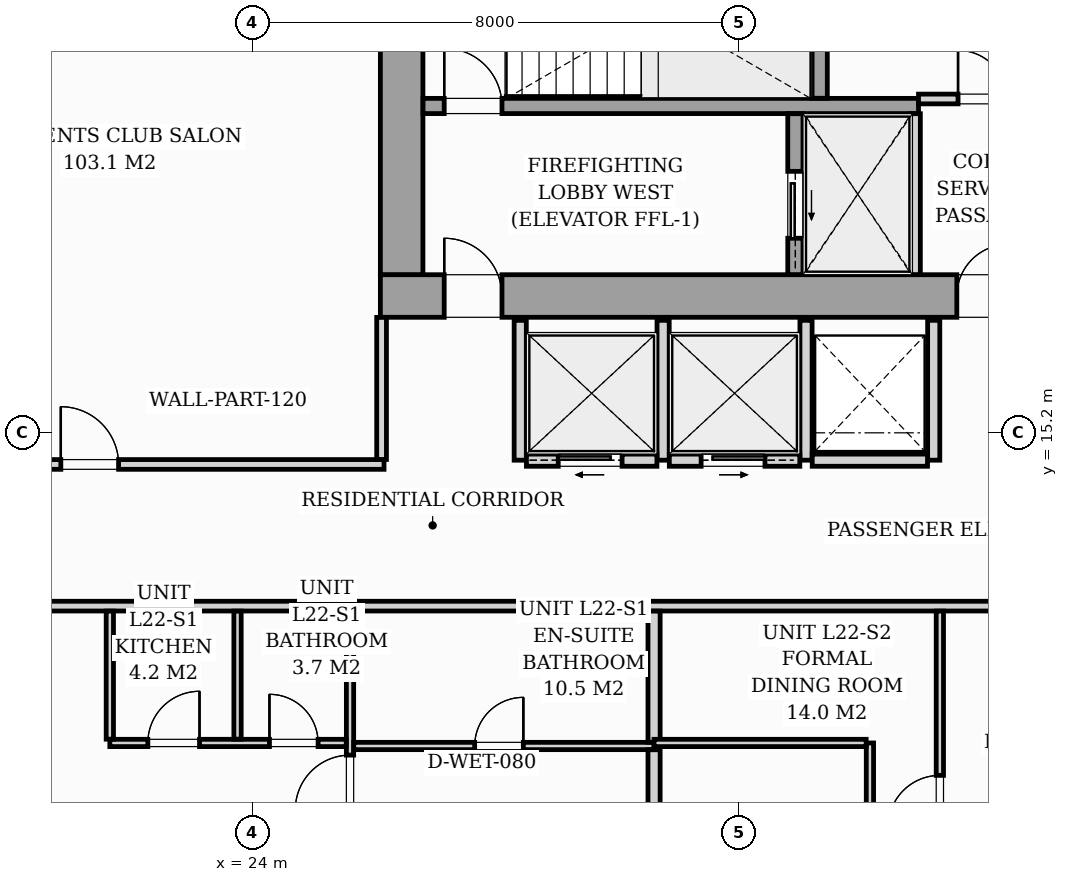
"""IFC4 building model, lengths in metres.
Left out: names, types, materials, properties, quantities, classifications, styles, units other than length and angle.
Written with IfcOpenShell. Run it as: python <this file> out.ifc"""

import sys

from ifc_helpers import new_model, si_unit, direction, frame, frame_2d, origin, origin_2d, place, context, subcontext, project, spatial, rectangle, i_section, extrude, source, transform, mapped, element, fill, save


model = new_model("IFC4")
c1 = context("Model", 3, precision=1e-05, world=origin(), true_north=direction((0.0, 1.0)))
c2 = subcontext(c1, "Body", "Model", "MODEL_VIEW")
j1 = project(units=[si_unit("LENGTHUNIT", "METRE"), si_unit("PLANEANGLEUNIT", "RADIAN")], contexts=[c1])
p1 = place(None, origin())
s1 = spatial("IfcSite", under=j1, at=p1, CompositionType="ELEMENT")
p2 = place(p1, origin())
s2 = spatial("IfcBuilding", under=s1, at=p2, CompositionType="ELEMENT")
p3 = place(p2, frame((0.0, 0.0, 81.0)))
s3 = spatial("IfcBuildingStorey", under=s2, at=p3, CompositionType="ELEMENT", Elevation=81.0)
m1 = source(origin(), c2, "Body", "SweptSolid", [
    extrude(i_section(OverallWidth=0.427, OverallDepth=0.483, WebThickness=0.051, FlangeThickness=0.082, FilletRadius=0.018, at=origin_2d()), origin(), (0.0, 0.0, 1.0), 3.196),
])
for number, where, z_axis, x_axis in (
    (1, (26.4, 17.4, 0.002), (0.0, 0.0, 1.0), (1.0, 0.0, 0.0)),
    (2, (33.12, 17.4, 0.002), (0.0, 0.0, 1.0), (1.0, 0.0, 0.0)),
):
    element("IfcColumn", number, at=place(p3, frame(where, z_axis=z_axis, x_axis=x_axis)), inside=s3, PredefinedType="PILASTER", context=c2, shape_type="MappedRepresentation", body=[
        mapped(m1, transform((0.0, 0.0, 0.0), scale=1.0)),
    ])
p4 = place(p3, frame((26.1, 17.45, 0.0), z_axis=(0.0, 0.0, 1.0), x_axis=(1.0, 0.0, 0.0)))
e3 = element("IfcWall", 3, at=p4, inside=s3, PredefinedType="SHEAR", context=c2, shape_type="SweptSolid", body=[
    extrude(rectangle(XDim=19.8, YDim=0.7, at=frame_2d((9.9, 0.0))), origin(), (0.0, 0.0, 1.0), 3.2),
])
p5 = place(p4, frame((1.05, 0.0, 0.0)))
e4 = element("IfcOpeningElement", 4, at=p5, cuts=e3, PredefinedType="OPENING", context=c2, shape_type="SweptSolid", body=[
    extrude(rectangle(XDim=0.95, YDim=2.06, at=frame_2d((0.475, 1.03))), frame((0.0, 0.36, 0.0), z_axis=(0.0, -1.0, 0.0), x_axis=(1.0, 0.0, 0.0)), (0.0, 0.0, 1.0), 0.72),
])
p6 = place(p4, frame((9.48, 0.0, 0.0)))
e5 = element("IfcOpeningElement", 5, at=p6, cuts=e3, PredefinedType="OPENING", context=c2, shape_type="SweptSolid", body=[
    extrude(rectangle(XDim=0.85, YDim=2.0, at=frame_2d((0.425, 1.0))), frame((0.0, 0.36, 0.0), z_axis=(0.0, -1.0, 0.0), x_axis=(1.0, 0.0, 0.0)), (0.0, 0.0, 1.0), 0.72),
])
p7 = place(p4, frame((17.65, 0.0, 0.0)))
e6 = element("IfcOpeningElement", 6, at=p7, cuts=e3, PredefinedType="OPENING", context=c2, shape_type="SweptSolid", body=[
    extrude(rectangle(XDim=0.95, YDim=2.06, at=frame_2d((0.475, 1.03))), frame((0.0, 0.36, 0.0), z_axis=(0.0, -1.0, 0.0), x_axis=(1.0, 0.0, 0.0)), (0.0, 0.0, 1.0), 0.72),
])
p8 = place(p3, frame((26.45, 17.802, 0.0), z_axis=(0.0, 0.0, 1.0), x_axis=(0.0, 1.0, 0.0)))
e7 = element("IfcWall", 7, at=p8, inside=s3, PredefinedType="SHEAR", context=c2, shape_type="SweptSolid", body=[
    extrude(rectangle(XDim=5.796, YDim=0.7, at=frame_2d((2.898, 0.0))), origin(), (0.0, 0.0, 1.0), 3.2),
])
p9 = place(p3, frame((26.802, 20.575, 0.0), z_axis=(0.0, 0.0, 1.0), x_axis=(1.0, 0.0, 0.0)))
e8 = element("IfcWall", 8, at=p9, inside=s3, PredefinedType="SOLIDWALL", context=c2, shape_type="SweptSolid", body=[
    extrude(rectangle(XDim=8.148, YDim=0.25, at=frame_2d((4.074, 0.0))), origin(), (0.0, 0.0, 1.0), 3.2),
])
p10 = place(p9, frame((0.348, 0.0, 0.0)))
e9 = element("IfcOpeningElement", 9, at=p10, cuts=e8, PredefinedType="OPENING", context=c2, shape_type="SweptSolid", body=[
    extrude(rectangle(XDim=0.95, YDim=2.06, at=frame_2d((0.475, 1.03))), frame((0.0, 0.135, 0.0), z_axis=(0.0, -1.0, 0.0), x_axis=(1.0, 0.0, 0.0)), (0.0, 0.0, 1.0), 0.27),
])
p11 = place(p3, frame((33.325, 20.702, 0.0), z_axis=(0.0, 0.0, 1.0), x_axis=(0.0, 1.0, 0.0)))
e10 = element("IfcWall", 10, at=p11, inside=s3, PredefinedType="SOLIDWALL", context=c2, shape_type="SweptSolid", body=[
    extrude(rectangle(XDim=2.896, YDim=0.25, at=frame_2d((1.448, 0.0))), origin(), (0.0, 0.0, 1.0), 3.2),
])
p12 = place(p3, frame((32.925, 17.802, 0.0), z_axis=(0.0, 0.0, 1.0), x_axis=(0.0, 1.0, 0.0)))
e11 = element("IfcWall", 11, at=p12, inside=s3, PredefinedType="SOLIDWALL", context=c2, shape_type="SweptSolid", body=[
    extrude(rectangle(XDim=2.646, YDim=0.25, at=frame_2d((1.323, 0.0))), origin(), (0.0, 0.0, 1.0), 3.2),
])
p13 = place(p12, frame((0.598, 0.0, 0.0)))
e12 = element("IfcOpeningElement", 12, at=p13, cuts=e11, PredefinedType="OPENING", context=c2, shape_type="SweptSolid", body=[
    extrude(rectangle(XDim=1.1, YDim=2.08, at=frame_2d((0.55, 1.04))), frame((0.0, 0.135, 0.0), z_axis=(0.0, -1.0, 0.0), x_axis=(1.0, 0.0, 0.0)), (0.0, 0.0, 1.0), 0.27),
])
p14 = place(p3, frame((34.9, 17.802, 0.0), z_axis=(0.0, 0.0, 1.0), x_axis=(0.0, 1.0, 0.0)))
e13 = element("IfcWall", 13, at=p14, inside=s3, PredefinedType="PARTITIONING", context=c2, shape_type="SweptSolid", body=[
    extrude(rectangle(XDim=2.646, YDim=0.16, at=frame_2d((1.323, 0.0))), origin(), (0.0, 0.0, 1.0), 2.94),
])
p15 = place(p3, frame((34.95, 20.69, 0.0), z_axis=(0.0, 0.0, 1.0), x_axis=(1.0, 0.0, 0.0)))
e14 = element("IfcWall", 14, at=p15, inside=s3, PredefinedType="PARTITIONING", context=c2, shape_type="SweptSolid", body=[
    extrude(rectangle(XDim=2.1, YDim=0.16, at=frame_2d((1.05, 0.0))), origin(), (0.0, 0.0, 1.0), 2.94),
])
p16 = place(p15, frame((0.65, 0.0, 0.0)))
e15 = element("IfcOpeningElement", 15, at=p16, cuts=e14, PredefinedType="OPENING", context=c2, shape_type="SweptSolid", body=[
    extrude(rectangle(XDim=0.8, YDim=2.05, at=frame_2d((0.4, 1.025))), frame((0.0, 0.09, 0.0), z_axis=(0.0, -1.0, 0.0), x_axis=(1.0, 0.0, 0.0)), (0.0, 0.0, 1.0), 0.18),
])
for number, where, z_axis, x_axis in (
    (16, (28.4, 14.75, 0.0), (0.0, 0.0, 1.0), (0.0, 1.0, 0.0)),
    (17, (30.75, 14.75, 0.0), (0.0, 0.0, 1.0), (0.0, 1.0, 0.0)),
    (18, (33.1, 14.75, 0.0), (0.0, 0.0, 1.0), (0.0, 1.0, 0.0)),
):
    element("IfcWall", number, at=place(p3, frame(where, z_axis=z_axis, x_axis=x_axis)), inside=s3, PredefinedType="PARTITIONING", context=c2, shape_type="SweptSolid", body=[
        extrude(rectangle(XDim=2.3, YDim=0.2, at=frame_2d((1.15, 0.0))), origin(), (0.0, 0.0, 1.0), 2.94),
    ])
p17 = place(p3, frame((28.502, 14.75, 0.0), z_axis=(0.0, 0.0, 1.0), x_axis=(1.0, 0.0, 0.0)))
e19 = element("IfcWall", 19, at=p17, inside=s3, PredefinedType="PARTITIONING", context=c2, shape_type="SweptSolid", body=[
    extrude(rectangle(XDim=2.146, YDim=0.2, at=frame_2d((1.073, 0.0))), origin(), (0.0, 0.0, 1.0), 2.94),
])
p18 = place(p17, frame((0.523, 0.0, 0.0)))
e20 = element("IfcOpeningElement", 20, at=p18, cuts=e19, PredefinedType="OPENING", context=c2, shape_type="SweptSolid", body=[
    extrude(rectangle(XDim=1.05, YDim=2.08, at=frame_2d((0.525, 1.04))), frame((0.0, 0.11, 0.0), z_axis=(0.0, -1.0, 0.0), x_axis=(1.0, 0.0, 0.0)), (0.0, 0.0, 1.0), 0.22),
])
p19 = place(p3, frame((30.852, 14.75, 0.0), z_axis=(0.0, 0.0, 1.0), x_axis=(1.0, 0.0, 0.0)))
e21 = element("IfcWall", 21, at=p19, inside=s3, PredefinedType="PARTITIONING", context=c2, shape_type="SweptSolid", body=[
    extrude(rectangle(XDim=2.146, YDim=0.2, at=frame_2d((1.073, 0.0))), origin(), (0.0, 0.0, 1.0), 2.94),
])
p20 = place(p19, frame((0.523, 0.0, 0.0)))
e22 = element("IfcOpeningElement", 22, at=p20, cuts=e21, PredefinedType="OPENING", context=c2, shape_type="SweptSolid", body=[
    extrude(rectangle(XDim=1.05, YDim=2.08, at=frame_2d((0.525, 1.04))), frame((0.0, 0.11, 0.0), z_axis=(0.0, -1.0, 0.0), x_axis=(1.0, 0.0, 0.0)), (0.0, 0.0, 1.0), 0.22),
])
p21 = place(p3, frame((35.2, 14.75, 0.0), z_axis=(0.0, 0.0, 1.0), x_axis=(0.0, 1.0, 0.0)))
e23 = element("IfcWall", 23, at=p21, inside=s3, PredefinedType="PARTITIONING", context=c2, shape_type="SweptSolid", body=[
    extrude(rectangle(XDim=2.3, YDim=0.2, at=frame_2d((1.15, 0.0))), origin(), (0.0, 0.0, 1.0), 2.94),
])
p22 = place(p3, frame((33.202, 14.75, 0.0), z_axis=(0.0, 0.0, 1.0), x_axis=(1.0, 0.0, 0.0)))
e24 = element("IfcWall", 24, at=p22, inside=s3, PredefinedType="PARTITIONING", context=c2, shape_type="SweptSolid", body=[
    extrude(rectangle(XDim=1.896, YDim=0.2, at=frame_2d((0.948, 0.0))), origin(), (0.0, 0.0, 1.0), 2.94),
])
p23 = place(p3, frame((16.6, 12.35, 0.0), z_axis=(0.0, 0.0, 1.0), x_axis=(1.0, 0.0, 0.0)))
e25 = element("IfcWall", 25, at=p23, inside=s3, PredefinedType="PARTITIONING", context=c2, shape_type="SweptSolid", body=[
    extrude(rectangle(XDim=37.6, YDim=0.16, at=frame_2d((18.8, 0.0))), origin(), (0.0, 0.0, 1.0), 2.94),
])
p24 = place(p23, frame((2.091, 0.0, 0.0)))
e26 = element("IfcOpeningElement", 26, at=p24, cuts=e25, PredefinedType="OPENING", context=c2, shape_type="SweptSolid", body=[
    extrude(rectangle(XDim=0.95, YDim=2.06, at=frame_2d((0.475, 1.03))), frame((0.0, 0.09, 0.0), z_axis=(0.0, -1.0, 0.0), x_axis=(1.0, 0.0, 0.0)), (0.0, 0.0, 1.0), 0.18),
])
p25 = place(p23, frame((26.146, 0.0, 0.0)))
e27 = element("IfcOpeningElement", 27, at=p25, cuts=e25, PredefinedType="OPENING", context=c2, shape_type="SweptSolid", body=[
    extrude(rectangle(XDim=0.95, YDim=2.06, at=frame_2d((0.475, 1.03))), frame((0.0, 0.09, 0.0), z_axis=(0.0, -1.0, 0.0), x_axis=(1.0, 0.0, 0.0)), (0.0, 0.0, 1.0), 0.18),
])
p26 = place(p3, frame((25.601, 5.208, 0.0), z_axis=(0.0, 0.0, 1.0), x_axis=(0.0, 1.0, 0.0)))
e28 = element("IfcWall", 28, at=p26, inside=s3, PredefinedType="PARTITIONING", context=c2, shape_type="SweptSolid", body=[
    extrude(rectangle(XDim=7.061, YDim=0.12, at=frame_2d((3.53, 0.0))), origin(), (0.0, 0.0, 1.0), 2.94),
])
p27 = place(p26, frame((3.792, 0.0, 0.0)))
e29 = element("IfcOpeningElement", 29, at=p27, cuts=e28, PredefinedType="OPENING", context=c2, shape_type="SweptSolid", body=[
    extrude(rectangle(XDim=0.9, YDim=2.05, at=frame_2d((0.45, 1.025))), frame((0.0, 0.07, 0.0), z_axis=(0.0, -1.0, 0.0), x_axis=(1.0, 0.0, 0.0)), (0.0, 0.0, 1.0), 0.14),
])
p28 = place(p3, frame((21.651, 10.1, 0.0), z_axis=(0.0, 0.0, 1.0), x_axis=(1.0, 0.0, 0.0)))
e30 = element("IfcWall", 30, at=p28, inside=s3, PredefinedType="PARTITIONING", context=c2, shape_type="SweptSolid", body=[
    extrude(rectangle(XDim=3.888, YDim=0.12, at=frame_2d((1.944, 0.0))), origin(), (0.0, 0.0, 1.0), 2.94),
])
p29 = place(p28, frame((0.625, 0.0, 0.0)))
e31 = element("IfcOpeningElement", 31, at=p29, cuts=e30, PredefinedType="OPENING", context=c2, shape_type="SweptSolid", body=[
    extrude(rectangle(XDim=0.85, YDim=2.05, at=frame_2d((0.425, 1.025))), frame((0.0, 0.07, 0.0), z_axis=(0.0, -1.0, 0.0), x_axis=(1.0, 0.0, 0.0)), (0.0, 0.0, 1.0), 0.14),
])
p30 = place(p28, frame((2.625, 0.0, 0.0)))
e32 = element("IfcOpeningElement", 32, at=p30, cuts=e30, PredefinedType="OPENING", context=c2, shape_type="SweptSolid", body=[
    extrude(rectangle(XDim=0.8, YDim=2.02, at=frame_2d((0.4, 1.01))), frame((0.0, 0.07, 0.0), z_axis=(0.0, -1.0, 0.0), x_axis=(1.0, 0.0, 0.0)), (0.0, 0.0, 1.0), 0.14),
])
for number, where, z_axis, x_axis in (
    (33, (23.751, 10.162, 0.0), (0.0, 0.0, 1.0), (0.0, 1.0, 0.0)),
    (34, (21.651, 10.162, 0.0), (0.0, 0.0, 1.0), (0.0, 1.0, 0.0)),
):
    element("IfcWall", number, at=place(p3, frame(where, z_axis=z_axis, x_axis=x_axis)), inside=s3, PredefinedType="PARTITIONING", context=c2, shape_type="SweptSolid", body=[
        extrude(rectangle(XDim=2.106, YDim=0.12, at=frame_2d((1.053, 0.0))), origin(), (0.0, 0.0, 1.0), 2.94),
    ])
p31 = place(p3, frame((25.663, 10.05, 0.0), z_axis=(0.0, 0.0, 1.0), x_axis=(1.0, 0.0, 0.0)))
e35 = element("IfcWall", 35, at=p31, inside=s3, PredefinedType="PARTITIONING", context=c2, shape_type="SweptSolid", body=[
    extrude(rectangle(XDim=4.938, YDim=0.12, at=frame_2d((2.469, 0.0))), origin(), (0.0, 0.0, 1.0), 2.94),
])
p32 = place(p31, frame((1.988, 0.0, 0.0)))
e36 = element("IfcOpeningElement", 36, at=p32, cuts=e35, PredefinedType="OPENING", context=c2, shape_type="SweptSolid", body=[
    extrude(rectangle(XDim=0.8, YDim=2.02, at=frame_2d((0.4, 1.01))), frame((0.0, 0.07, 0.0), z_axis=(0.0, -1.0, 0.0), x_axis=(1.0, 0.0, 0.0)), (0.0, 0.0, 1.0), 0.14),
])
p33 = place(p3, frame((30.601, 5.689, 0.0), z_axis=(0.0, 0.0, 1.0), x_axis=(0.0, 1.0, 0.0)))
e37 = element("IfcWall", 37, at=p33, inside=s3, PredefinedType="PARTITIONING", context=c2, shape_type="SweptSolid", body=[
    extrude(rectangle(XDim=4.299, YDim=0.2, at=frame_2d((2.149, 0.0))), origin(), (0.0, 0.0, 1.0), 2.94),
])
p34 = place(p3, frame((30.601, 10.112, 0.0), z_axis=(0.0, 0.0, 1.0), x_axis=(0.0, 1.0, 0.0)))
e38 = element("IfcWall", 38, at=p34, inside=s3, PredefinedType="PARTITIONING", context=c2, shape_type="SweptSolid", body=[
    extrude(rectangle(XDim=2.156, YDim=0.2, at=frame_2d((1.078, 0.0))), origin(), (0.0, 0.0, 1.0), 2.94),
])
p35 = place(p3, frame((34.151, 5.848, 0.0), z_axis=(0.0, 0.0, 1.0), x_axis=(0.0, 1.0, 0.0)))
e39 = element("IfcWall", 39, at=p35, inside=s3, PredefinedType="PARTITIONING", context=c2, shape_type="SweptSolid", body=[
    extrude(rectangle(XDim=4.252, YDim=0.12, at=frame_2d((2.126, 0.0))), origin(), (0.0, 0.0, 1.0), 2.94),
])
p36 = place(p35, frame((1.525, 0.0, 0.0)))
e40 = element("IfcOpeningElement", 40, at=p36, cuts=e39, PredefinedType="OPENING", context=c2, shape_type="SweptSolid", body=[
    extrude(rectangle(XDim=0.85, YDim=2.05, at=frame_2d((0.425, 1.025))), frame((0.0, 0.07, 0.0), z_axis=(0.0, -1.0, 0.0), x_axis=(1.0, 0.0, 0.0)), (0.0, 0.0, 1.0), 0.14),
])
p37 = place(p3, frame((30.601, 10.1, 0.0), z_axis=(0.0, 0.0, 1.0), x_axis=(1.0, 0.0, 0.0)))
e41 = element("IfcWall", 41, at=p37, inside=s3, PredefinedType="PARTITIONING", context=c2, shape_type="SweptSolid", body=[
    extrude(rectangle(XDim=3.488, YDim=0.12, at=frame_2d((1.744, 0.0))), origin(), (0.0, 0.0, 1.0), 2.94),
])
p38 = place(p3, frame((35.301, 5.958, 0.0), z_axis=(0.0, 0.0, 1.0), x_axis=(0.0, 1.0, 0.0)))
e42 = element("IfcWall", 42, at=p38, inside=s3, PredefinedType="PARTITIONING", context=c2, shape_type="SweptSolid", body=[
    extrude(rectangle(XDim=6.31, YDim=0.12, at=frame_2d((3.155, 0.0))), origin(), (0.0, 0.0, 1.0), 2.94),
])
p39 = place(p38, frame((2.758, 0.0, 0.0)))
e43 = element("IfcOpeningElement", 43, at=p39, cuts=e42, PredefinedType="OPENING", context=c2, shape_type="SweptSolid", body=[
    extrude(rectangle(XDim=0.85, YDim=2.05, at=frame_2d((0.425, 1.025))), frame((0.0, 0.07, 0.0), z_axis=(0.0, -1.0, 0.0), x_axis=(1.0, 0.0, 0.0)), (0.0, 0.0, 1.0), 0.14),
])
p40 = place(p3, frame((16.682, 14.68, 0.0), z_axis=(0.0, 0.0, 1.0), x_axis=(1.0, 0.0, 0.0)))
e44 = element("IfcWall", 44, at=p40, inside=s3, PredefinedType="PARTITIONING", context=c2, shape_type="SweptSolid", body=[
    extrude(rectangle(XDim=9.478, YDim=0.16, at=frame_2d((4.739, 0.0))), origin(), (0.0, 0.0, 1.0), 2.94),
])
p41 = place(p40, frame((4.163, 0.0, 0.0)))
e45 = element("IfcOpeningElement", 45, at=p41, cuts=e44, PredefinedType="OPENING", context=c2, shape_type="SweptSolid", body=[
    extrude(rectangle(XDim=0.95, YDim=2.06, at=frame_2d((0.475, 1.03))), frame((0.0, 0.09, 0.0), z_axis=(0.0, -1.0, 0.0), x_axis=(1.0, 0.0, 0.0)), (0.0, 0.0, 1.0), 0.18),
])
p42 = place(p3, frame((26.12, 14.762, 0.0), z_axis=(0.0, 0.0, 1.0), x_axis=(0.0, 1.0, 0.0)))
e46 = element("IfcWall", 46, at=p42, inside=s3, PredefinedType="PARTITIONING", context=c2, shape_type="SweptSolid", body=[
    extrude(rectangle(XDim=2.336, YDim=0.16, at=frame_2d((1.168, 0.0))), origin(), (0.0, 0.0, 1.0), 2.94),
])
m2 = source(origin(), c2, "Body", "SweptSolid", [
    extrude(rectangle(XDim=0.95, YDim=2.06, at=frame_2d((0.475, 1.03))), frame((0.0, 0.025, 0.0), z_axis=(0.0, -1.0, 0.0), x_axis=(1.0, 0.0, 0.0)), (0.0, 0.0, 1.0), 0.05),
])
p43 = place(p5, origin())
e47 = element("IfcDoor", 47, at=p43, inside=s3, OperationType="SINGLE_SWING_LEFT", PredefinedType="DOOR", context=c2, shape_type="MappedRepresentation", body=[
    mapped(m2, transform((0.0, 0.0, 0.0), scale=1.0)),
])
fill(e4, e47)
m3 = source(origin(), c2, "Body", "SweptSolid", [
    extrude(rectangle(XDim=0.85, YDim=2.0, at=frame_2d((0.425, 1.0))), frame((0.0, 0.025, 0.0), z_axis=(0.0, -1.0, 0.0), x_axis=(1.0, 0.0, 0.0)), (0.0, 0.0, 1.0), 0.05),
])
p44 = place(p6, origin())
e48 = element("IfcDoor", 48, at=p44, inside=s3, OperationType="SINGLE_SWING_RIGHT", PredefinedType="DOOR", context=c2, shape_type="MappedRepresentation", body=[
    mapped(m3, transform((0.0, 0.0, 0.0), scale=1.0)),
])
fill(e5, e48)
p45 = place(p10, origin())
e49 = element("IfcDoor", 49, at=p45, inside=s3, OperationType="SINGLE_SWING_LEFT", PredefinedType="DOOR", context=c2, shape_type="MappedRepresentation", body=[
    mapped(m2, transform((0.0, 0.0, 0.0), scale=1.0)),
])
fill(e9, e49)
m4 = source(origin(), c2, "Body", "SweptSolid", [
    extrude(rectangle(XDim=1.1, YDim=2.08, at=frame_2d((0.55, 1.04))), frame((0.0, 0.025, 0.0), z_axis=(0.0, -1.0, 0.0), x_axis=(1.0, 0.0, 0.0)), (0.0, 0.0, 1.0), 0.05),
])
p46 = place(p13, origin())
e50 = element("IfcDoor", 50, at=p46, inside=s3, OperationType="SLIDING_TO_LEFT", PredefinedType="DOOR", context=c2, shape_type="MappedRepresentation", body=[
    mapped(m4, transform((0.0, 0.0, 0.0), scale=1.0)),
])
fill(e12, e50)
m5 = source(origin(), c2, "Body", "SweptSolid", [
    extrude(rectangle(XDim=0.8, YDim=2.05, at=frame_2d((0.4, 1.025))), frame((0.0, 0.025, 0.0), z_axis=(0.0, -1.0, 0.0), x_axis=(1.0, 0.0, 0.0)), (0.0, 0.0, 1.0), 0.05),
])
p47 = place(p16, origin())
e51 = element("IfcDoor", 51, at=p47, inside=s3, OperationType="SINGLE_SWING_LEFT", PredefinedType="DOOR", context=c2, shape_type="MappedRepresentation", body=[
    mapped(m5, transform((0.0, 0.0, 0.0), scale=1.0)),
])
fill(e15, e51)
m6 = source(origin(), c2, "Body", "SweptSolid", [
    extrude(rectangle(XDim=1.05, YDim=2.08, at=frame_2d((0.525, 1.04))), frame((0.0, 0.025, 0.0), z_axis=(0.0, -1.0, 0.0), x_axis=(1.0, 0.0, 0.0)), (0.0, 0.0, 1.0), 0.05),
])
p48 = place(p18, origin())
e52 = element("IfcDoor", 52, at=p48, inside=s3, OperationType="SLIDING_TO_LEFT", PredefinedType="DOOR", context=c2, shape_type="MappedRepresentation", body=[
    mapped(m6, transform((0.0, 0.0, 0.0), scale=1.0)),
])
fill(e20, e52)
p49 = place(p20, origin())
e53 = element("IfcDoor", 53, at=p49, inside=s3, OperationType="SLIDING_TO_RIGHT", PredefinedType="DOOR", context=c2, shape_type="MappedRepresentation", body=[
    mapped(m6, transform((0.0, 0.0, 0.0), scale=1.0)),
])
fill(e22, e53)
m7 = source(origin(), c2, "Body", "SweptSolid", [
    extrude(rectangle(XDim=0.8, YDim=2.02, at=frame_2d((0.4, 1.01))), frame((0.0, 0.025, 0.0), z_axis=(0.0, -1.0, 0.0), x_axis=(1.0, 0.0, 0.0)), (0.0, 0.0, 1.0), 0.05),
])
p50 = place(p32, origin())
e54 = element("IfcDoor", 54, at=p50, inside=s3, OperationType="SINGLE_SWING_RIGHT", PredefinedType="DOOR", context=c2, shape_type="MappedRepresentation", body=[
    mapped(m7, transform((0.0, 0.0, 0.0), scale=1.0)),
])
fill(e36, e54)
m8 = source(origin(), c2, "Body", "SweptSolid", [
    extrude(rectangle(XDim=0.9, YDim=2.05, at=frame_2d((0.45, 1.025))), frame((0.0, 0.025, 0.0), z_axis=(0.0, -1.0, 0.0), x_axis=(1.0, 0.0, 0.0)), (0.0, 0.0, 1.0), 0.05),
])
p51 = place(p27, origin())
e55 = element("IfcDoor", 55, at=p51, inside=s3, OperationType="SINGLE_SWING_LEFT", PredefinedType="DOOR", context=c2, shape_type="MappedRepresentation", body=[
    mapped(m8, transform((0.0, 0.0, 0.0), scale=1.0)),
])
fill(e29, e55)
m9 = source(origin(), c2, "Body", "SweptSolid", [
    extrude(rectangle(XDim=0.85, YDim=2.05, at=frame_2d((0.425, 1.025))), frame((0.0, 0.025, 0.0), z_axis=(0.0, -1.0, 0.0), x_axis=(1.0, 0.0, 0.0)), (0.0, 0.0, 1.0), 0.05),
])
p52 = place(p29, origin())
e56 = element("IfcDoor", 56, at=p52, inside=s3, OperationType="SINGLE_SWING_RIGHT", PredefinedType="DOOR", context=c2, shape_type="MappedRepresentation", body=[
    mapped(m9, transform((0.0, 0.0, 0.0), scale=1.0)),
])
fill(e31, e56)
p53 = place(p30, origin())
e57 = element("IfcDoor", 57, at=p53, inside=s3, OperationType="SINGLE_SWING_LEFT", PredefinedType="DOOR", context=c2, shape_type="MappedRepresentation", body=[
    mapped(m7, transform((0.0, 0.0, 0.0), scale=1.0)),
])
fill(e32, e57)
p54 = place(p39, origin())
e58 = element("IfcDoor", 58, at=p54, inside=s3, OperationType="SINGLE_SWING_LEFT", PredefinedType="DOOR", context=c2, shape_type="MappedRepresentation", body=[
    mapped(m9, transform((0.0, 0.0, 0.0), scale=1.0)),
])
fill(e43, e58)
m10 = source(origin(), c2, "Body", "SweptSolid", [
    extrude(rectangle(XDim=0.95, YDim=2.06, at=frame_2d((0.475, 1.03))), frame((0.0, 0.025, 0.0), z_axis=(0.0, -1.0, 0.0), x_axis=(1.0, 0.0, 0.0)), (0.0, 0.0, 1.0), 0.05),
])
p55 = place(p41, origin())
e59 = element("IfcDoor", 59, at=p55, inside=s3, OperationType="SINGLE_SWING_LEFT", PredefinedType="DOOR", context=c2, shape_type="MappedRepresentation", body=[
    mapped(m10, transform((0.0, 0.0, 0.0), scale=1.0)),
])
fill(e45, e59)
save(model, sys.argv[1])
